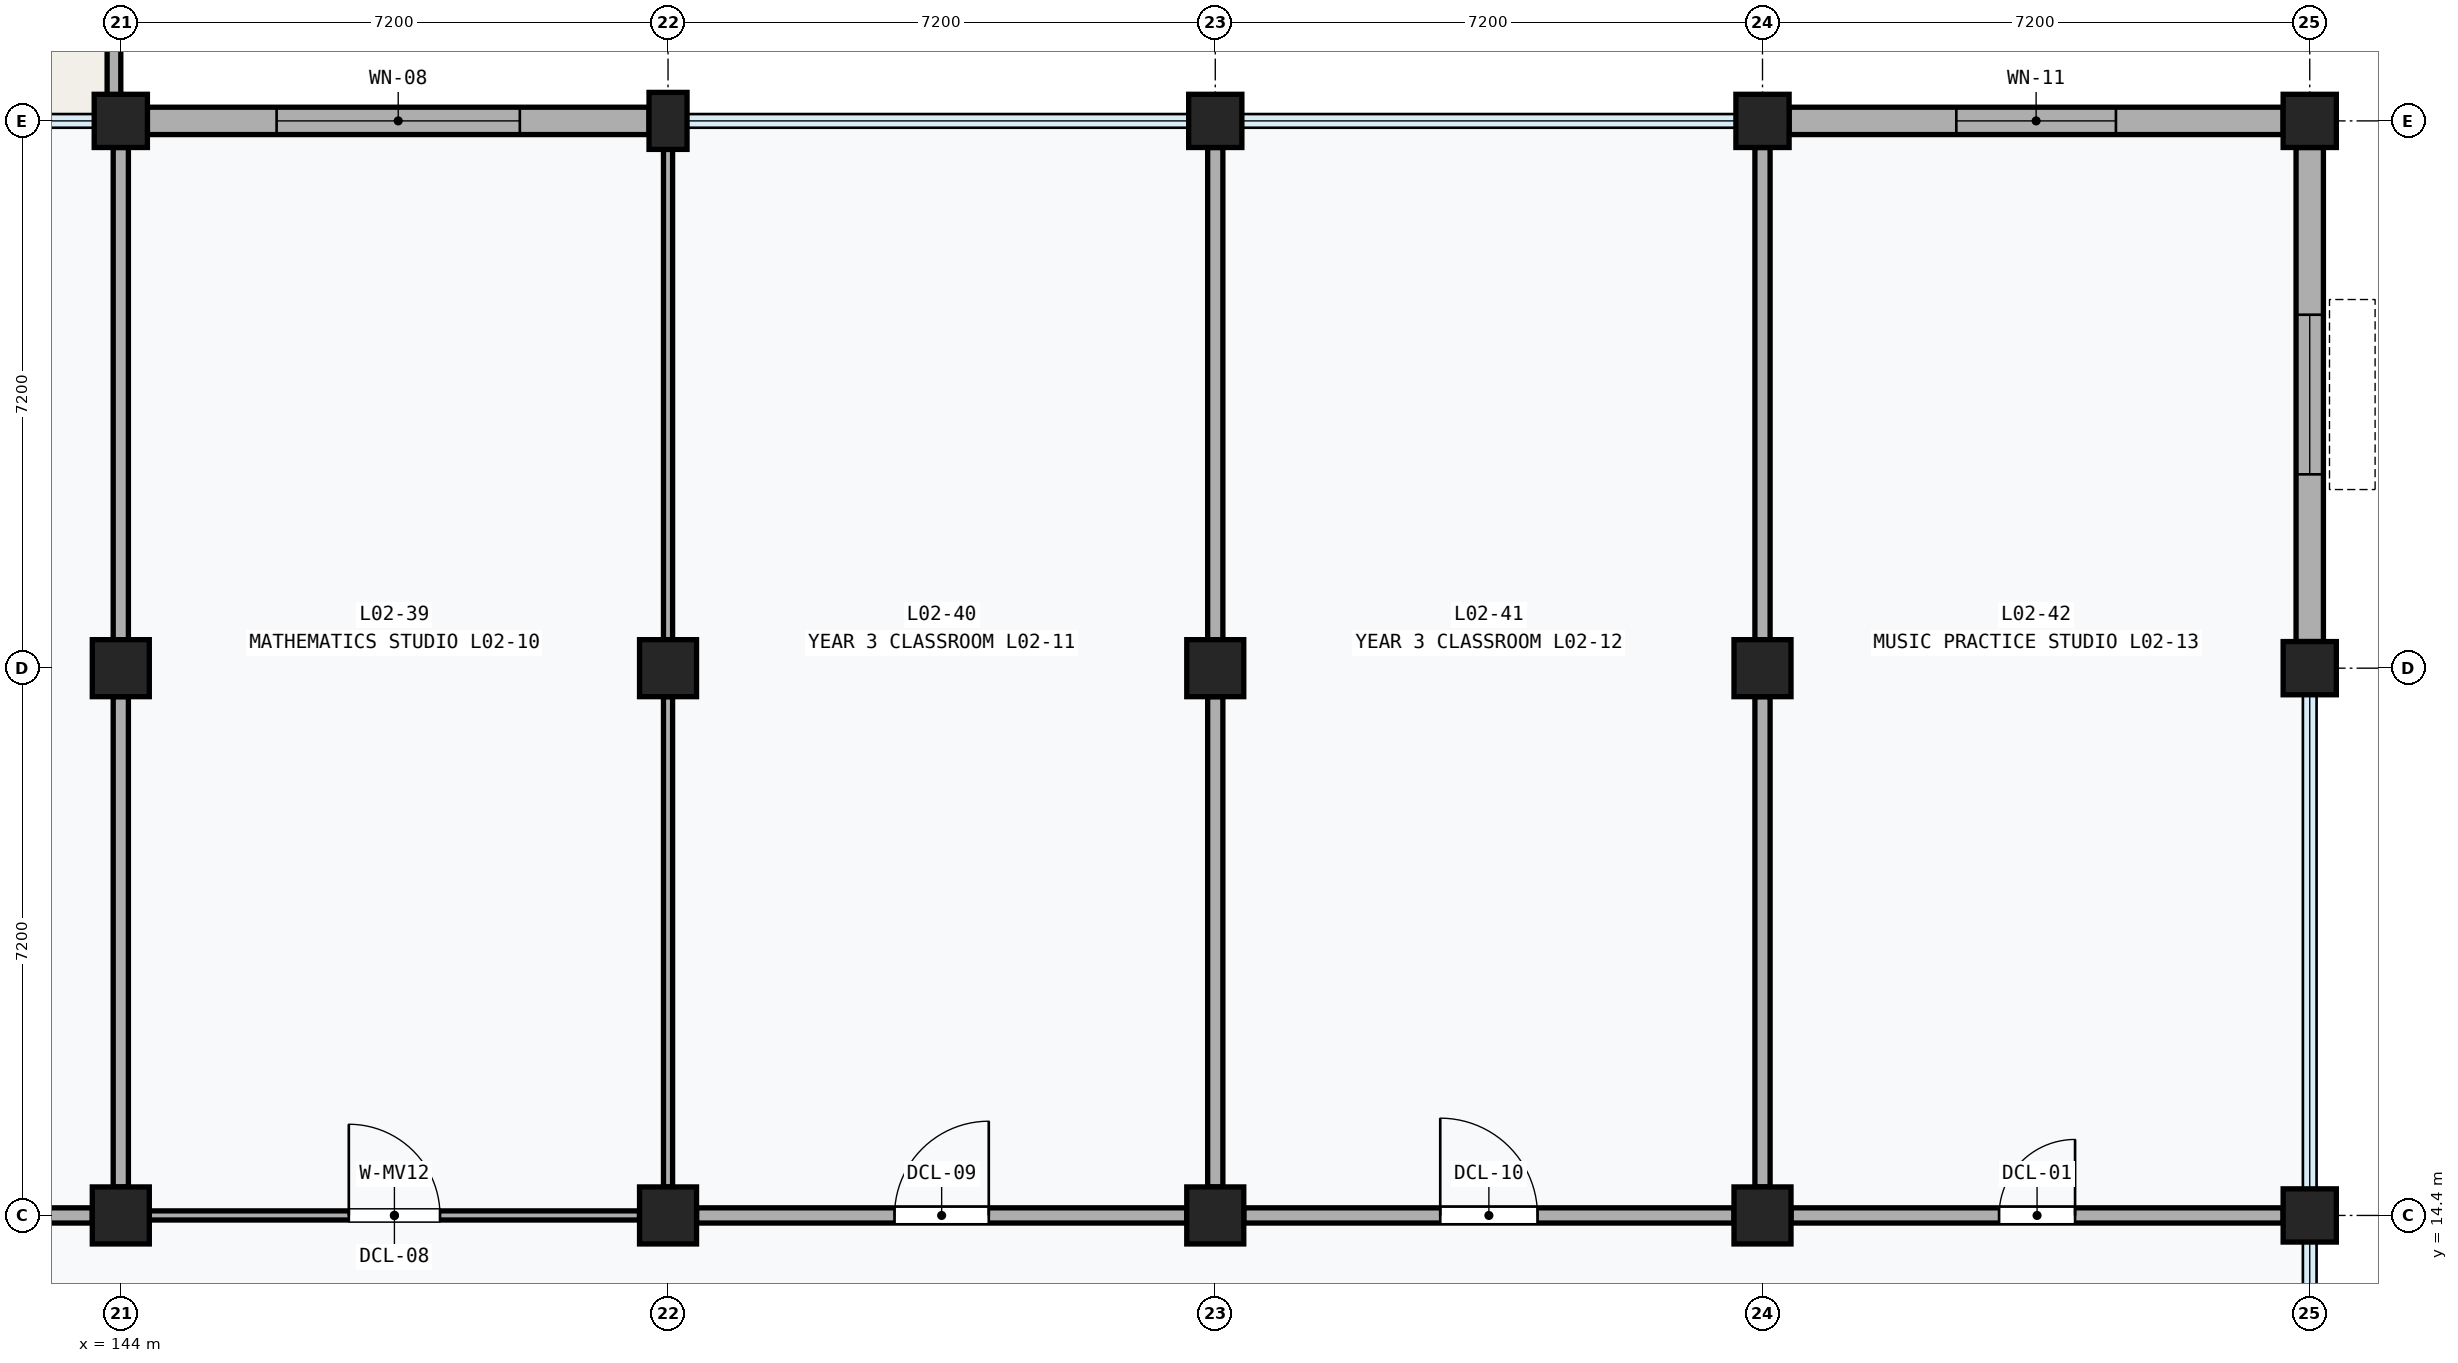
"""IFC4 building model, lengths in metres.
Left out: names, types, materials, properties, quantities, classifications, styles, units other than length and angle.
Written with IfcOpenShell. Run it as: python <this file> out.ifc"""

import sys

from ifc_helpers import new_model, si_unit, direction, frame, frame_2d, origin, origin_2d, place, context, subcontext, project, spatial, rectangle, extrude, element, fill, save


model = new_model("IFC4")
c1 = context("Model", 3, precision=1e-05, world=origin(), true_north=direction((0.0, 1.0)))
c2 = subcontext(c1, "Body", "Model", "MODEL_VIEW")
j1 = project(units=[si_unit("LENGTHUNIT", "METRE"), si_unit("PLANEANGLEUNIT", "RADIAN")], contexts=[c1])
p1 = place(None, origin())
s1 = spatial("IfcSite", under=j1, at=p1, CompositionType="ELEMENT")
p2 = place(p1, origin())
s2 = spatial("IfcBuilding", under=s1, at=p2, CompositionType="ELEMENT")
p3 = place(p2, frame((0.0, 0.0, 9.6)))
s3 = spatial("IfcBuildingStorey", under=s2, at=p3, CompositionType="ELEMENT", Elevation=9.6)
for number, where, z_axis, x_axis in (
    (1, (144.0, 14.4, 0.0), (0.0, 0.0, 1.0), (1.0, 0.0, 0.0)),
    (2, (144.0, 21.6, 0.0), (0.0, 0.0, 1.0), (1.0, 0.0, 0.0)),
):
    element("IfcColumn", number, at=place(p3, frame(where, z_axis=z_axis, x_axis=x_axis)), inside=s3, PredefinedType="COLUMN", context=c2, shape_type="SweptSolid", body=[
        extrude(rectangle(XDim=0.75, YDim=0.75, at=origin_2d()), origin(), (0.0, 0.0, 1.0), 4.8),
    ])
p4 = place(p3, frame((144.0, 28.8, 0.0), z_axis=(0.0, 0.0, 1.0), x_axis=(1.0, 0.0, 0.0)))
e3 = element("IfcColumn", 3, at=p4, inside=s3, PredefinedType="COLUMN", context=c2, shape_type="SweptSolid", body=[
    extrude(rectangle(XDim=0.7, YDim=0.7, at=origin_2d()), origin(), (0.0, 0.0, 1.0), 4.8),
])
for number, where, z_axis, x_axis in (
    (4, (151.2, 14.4, 0.0), (0.0, 0.0, 1.0), (1.0, 0.0, 0.0)),
    (5, (151.2, 21.6, 0.0), (0.0, 0.0, 1.0), (1.0, 0.0, 0.0)),
):
    element("IfcColumn", number, at=place(p3, frame(where, z_axis=z_axis, x_axis=x_axis)), inside=s3, PredefinedType="COLUMN", context=c2, shape_type="SweptSolid", body=[
        extrude(rectangle(XDim=0.75, YDim=0.75, at=origin_2d()), origin(), (0.0, 0.0, 1.0), 4.8),
    ])
p5 = place(p3, frame((151.2, 28.8, 0.0), z_axis=(0.0, 0.0, 1.0), x_axis=(1.0, 0.0, 0.0)))
e6 = element("IfcColumn", 6, at=p5, inside=s3, PredefinedType="PILASTER", context=c2, shape_type="SweptSolid", body=[
    extrude(rectangle(XDim=0.5, YDim=0.75, at=origin_2d()), origin(), (0.0, 0.0, 1.0), 4.8),
])
for number, where, z_axis, x_axis in (
    (7, (158.4, 14.4, 0.0), (0.0, 0.0, 1.0), (1.0, 0.0, 0.0)),
    (8, (158.4, 21.6, 0.0), (0.0, 0.0, 1.0), (1.0, 0.0, 0.0)),
):
    element("IfcColumn", number, at=place(p3, frame(where, z_axis=z_axis, x_axis=x_axis)), inside=s3, PredefinedType="COLUMN", context=c2, shape_type="SweptSolid", body=[
        extrude(rectangle(XDim=0.75, YDim=0.75, at=origin_2d()), origin(), (0.0, 0.0, 1.0), 4.8),
    ])
p6 = place(p3, frame((158.4, 28.8, 0.0), z_axis=(0.0, 0.0, 1.0), x_axis=(1.0, 0.0, 0.0)))
e9 = element("IfcColumn", 9, at=p6, inside=s3, PredefinedType="COLUMN", context=c2, shape_type="SweptSolid", body=[
    extrude(rectangle(XDim=0.7, YDim=0.7, at=origin_2d()), origin(), (0.0, 0.0, 1.0), 4.8),
])
for number, where, z_axis, x_axis in (
    (10, (165.6, 14.4, 0.0), (0.0, 0.0, 1.0), (1.0, 0.0, 0.0)),
    (11, (165.6, 21.6, 0.0), (0.0, 0.0, 1.0), (1.0, 0.0, 0.0)),
):
    element("IfcColumn", number, at=place(p3, frame(where, z_axis=z_axis, x_axis=x_axis)), inside=s3, PredefinedType="COLUMN", context=c2, shape_type="SweptSolid", body=[
        extrude(rectangle(XDim=0.75, YDim=0.75, at=origin_2d()), origin(), (0.0, 0.0, 1.0), 4.8),
    ])
for number, where, z_axis, x_axis in (
    (12, (165.6, 28.8, 0.0), (0.0, 0.0, 1.0), (1.0, 0.0, 0.0)),
    (13, (172.8, 14.4, 0.0), (0.0, 0.0, 1.0), (1.0, 0.0, 0.0)),
    (14, (172.8, 21.6, 0.0), (0.0, 0.0, 1.0), (1.0, 0.0, 0.0)),
    (15, (172.8, 28.8, 0.0), (0.0, 0.0, 1.0), (1.0, 0.0, 0.0)),
):
    element("IfcColumn", number, at=place(p3, frame(where, z_axis=z_axis, x_axis=x_axis)), inside=s3, PredefinedType="COLUMN", context=c2, shape_type="SweptSolid", body=[
        extrude(rectangle(XDim=0.7, YDim=0.7, at=origin_2d()), origin(), (0.0, 0.0, 1.0), 4.8),
    ])
p7 = place(p3, frame((144.35, 28.8, 0.0), z_axis=(0.0, 0.0, 1.0), x_axis=(1.0, 0.0, 0.0)))
e16 = element("IfcWall", 16, at=p7, inside=s3, PredefinedType="SOLIDWALL", context=c2, shape_type="SweptSolid", body=[
    extrude(rectangle(XDim=6.6, YDim=0.36, at=frame_2d((3.3, 0.0))), origin(), (0.0, 0.0, 1.0), 3.88),
])
p8 = place(p7, frame((1.7, 0.0, 0.9)))
e17 = element("IfcOpeningElement", 17, at=p8, cuts=e16, PredefinedType="OPENING", context=c2, shape_type="SweptSolid", body=[
    extrude(rectangle(XDim=3.2, YDim=1.8, at=frame_2d((1.6, 0.9))), frame((0.0, 0.192, 0.0), z_axis=(0.0, -1.0, 0.0), x_axis=(1.0, 0.0, 0.0)), (0.0, 0.0, 1.0), 0.384),
])
p9 = place(p3, frame((165.95, 28.8, 0.0), z_axis=(0.0, 0.0, 1.0), x_axis=(1.0, 0.0, 0.0)))
e18 = element("IfcWall", 18, at=p9, inside=s3, PredefinedType="SOLIDWALL", context=c2, shape_type="SweptSolid", body=[
    extrude(rectangle(XDim=6.5, YDim=0.36, at=frame_2d((3.25, 0.0))), origin(), (0.0, 0.0, 1.0), 3.88),
])
p10 = place(p9, frame((2.2, 0.0, 0.85)))
e19 = element("IfcOpeningElement", 19, at=p10, cuts=e18, PredefinedType="OPENING", context=c2, shape_type="SweptSolid", body=[
    extrude(rectangle(XDim=2.1, YDim=2.0, at=frame_2d((1.05, 1.0))), frame((0.0, 0.192, 0.0), z_axis=(0.0, -1.0, 0.0), x_axis=(1.0, 0.0, 0.0)), (0.0, 0.0, 1.0), 0.384),
])
p11 = place(p3, frame((172.8, 21.95, 0.0), z_axis=(0.0, 0.0, 1.0), x_axis=(0.0, 1.0, 0.0)))
e20 = element("IfcWall", 20, at=p11, inside=s3, PredefinedType="SOLIDWALL", context=c2, shape_type="SweptSolid", body=[
    extrude(rectangle(XDim=6.5, YDim=0.36, at=frame_2d((3.25, 0.0))), origin(), (0.0, 0.0, 1.0), 3.88),
])
p12 = place(p11, frame((2.2, 0.0, 0.85)))
e21 = element("IfcOpeningElement", 21, at=p12, cuts=e20, PredefinedType="OPENING", context=c2, shape_type="SweptSolid", body=[
    extrude(rectangle(XDim=2.1, YDim=2.0, at=frame_2d((1.05, 1.0))), frame((0.0, 0.192, 0.0), z_axis=(0.0, -1.0, 0.0), x_axis=(1.0, 0.0, 0.0)), (0.0, 0.0, 1.0), 0.384),
])
p13 = place(p3, frame((143.91, 28.89, 0.0), z_axis=(0.0, 0.0, 1.0), x_axis=(0.0, 1.0, 0.0)))
e22 = element("IfcWall", 22, at=p13, inside=s3, PredefinedType="PARAPET", context=c2, shape_type="SweptSolid", body=[
    extrude(rectangle(XDim=7.02, YDim=0.18, at=frame_2d((3.51, 0.0))), origin(), (0.0, 0.0, 1.0), 0.95),
])
p14 = place(p3, frame((137.175, 14.4, 0.0), z_axis=(0.0, 0.0, 1.0), x_axis=(1.0, 0.0, 0.0)))
e23 = element("IfcWall", 23, at=p14, inside=s3, PredefinedType="PARTITIONING", context=c2, shape_type="SweptSolid", body=[
    extrude(rectangle(XDim=6.45, YDim=0.2, at=frame_2d((3.225, 0.0))), origin(), (0.0, 0.0, 1.0), 3.74),
])
p15 = place(p14, frame((2.645, 0.0, 0.0)))
e24 = element("IfcOpeningElement", 24, at=p15, cuts=e23, PredefinedType="OPENING", context=c2, shape_type="SweptSolid", body=[
    extrude(rectangle(XDim=1.16, YDim=2.22, at=frame_2d((0.58, 1.11))), frame((0.0, 0.112, 0.0), z_axis=(0.0, -1.0, 0.0), x_axis=(1.0, 0.0, 0.0)), (0.0, 0.0, 1.0), 0.224),
])
p16 = place(p3, frame((144.0, 14.775, 0.0), z_axis=(0.0, 0.0, 1.0), x_axis=(0.0, 1.0, 0.0)))
e25 = element("IfcWall", 25, at=p16, inside=s3, PredefinedType="PARTITIONING", context=c2, shape_type="SweptSolid", body=[
    extrude(rectangle(XDim=6.45, YDim=0.2, at=frame_2d((3.225, 0.0))), origin(), (0.0, 0.0, 1.0), 3.74),
])
p17 = place(p3, frame((144.0, 21.975, 0.0), z_axis=(0.0, 0.0, 1.0), x_axis=(0.0, 1.0, 0.0)))
e26 = element("IfcWall", 26, at=p17, inside=s3, PredefinedType="PARTITIONING", context=c2, shape_type="SweptSolid", body=[
    extrude(rectangle(XDim=6.475, YDim=0.2, at=frame_2d((3.237, 0.0))), origin(), (0.0, 0.0, 1.0), 3.74),
])
p18 = place(p3, frame((144.375, 14.4, 0.0), z_axis=(0.0, 0.0, 1.0), x_axis=(1.0, 0.0, 0.0)))
e27 = element("IfcWall", 27, at=p18, inside=s3, PredefinedType="MOVABLE", context=c2, shape_type="SweptSolid", body=[
    extrude(rectangle(XDim=6.45, YDim=0.12, at=frame_2d((3.225, 0.0))), origin(), (0.0, 0.0, 1.0), 3.74),
])
p19 = place(p18, frame((2.625, 0.0, 0.0)))
e28 = element("IfcOpeningElement", 28, at=p19, cuts=e27, PredefinedType="OPENING", context=c2, shape_type="SweptSolid", body=[
    extrude(rectangle(XDim=1.2, YDim=2.24, at=frame_2d((0.6, 1.12))), frame((0.0, 0.072, 0.0), z_axis=(0.0, -1.0, 0.0), x_axis=(1.0, 0.0, 0.0)), (0.0, 0.0, 1.0), 0.144),
])
p20 = place(p3, frame((151.2, 14.775, 0.0), z_axis=(0.0, 0.0, 1.0), x_axis=(0.0, 1.0, 0.0)))
e29 = element("IfcWall", 29, at=p20, inside=s3, PredefinedType="MOVABLE", context=c2, shape_type="SweptSolid", body=[
    extrude(rectangle(XDim=6.45, YDim=0.12, at=frame_2d((3.225, 0.0))), origin(), (0.0, 0.0, 1.0), 3.74),
])
p21 = place(p3, frame((151.2, 21.975, 0.0), z_axis=(0.0, 0.0, 1.0), x_axis=(0.0, 1.0, 0.0)))
e30 = element("IfcWall", 30, at=p21, inside=s3, PredefinedType="MOVABLE", context=c2, shape_type="SweptSolid", body=[
    extrude(rectangle(XDim=6.45, YDim=0.12, at=frame_2d((3.225, 0.0))), origin(), (0.0, 0.0, 1.0), 3.74),
])
p22 = place(p3, frame((151.575, 14.4, 0.0), z_axis=(0.0, 0.0, 1.0), x_axis=(1.0, 0.0, 0.0)))
e31 = element("IfcWall", 31, at=p22, inside=s3, PredefinedType="PARTITIONING", context=c2, shape_type="SweptSolid", body=[
    extrude(rectangle(XDim=6.45, YDim=0.2, at=frame_2d((3.225, 0.0))), origin(), (0.0, 0.0, 1.0), 3.74),
])
p23 = place(p22, frame((2.605, 0.0, 0.0)))
e32 = element("IfcOpeningElement", 32, at=p23, cuts=e31, PredefinedType="OPENING", context=c2, shape_type="SweptSolid", body=[
    extrude(rectangle(XDim=1.24, YDim=2.26, at=frame_2d((0.62, 1.13))), frame((0.0, 0.112, 0.0), z_axis=(0.0, -1.0, 0.0), x_axis=(1.0, 0.0, 0.0)), (0.0, 0.0, 1.0), 0.224),
])
p24 = place(p3, frame((158.4, 14.775, 0.0), z_axis=(0.0, 0.0, 1.0), x_axis=(0.0, 1.0, 0.0)))
e33 = element("IfcWall", 33, at=p24, inside=s3, PredefinedType="PARTITIONING", context=c2, shape_type="SweptSolid", body=[
    extrude(rectangle(XDim=6.45, YDim=0.2, at=frame_2d((3.225, 0.0))), origin(), (0.0, 0.0, 1.0), 3.74),
])
p25 = place(p3, frame((158.4, 21.975, 0.0), z_axis=(0.0, 0.0, 1.0), x_axis=(0.0, 1.0, 0.0)))
e34 = element("IfcWall", 34, at=p25, inside=s3, PredefinedType="PARTITIONING", context=c2, shape_type="SweptSolid", body=[
    extrude(rectangle(XDim=6.475, YDim=0.2, at=frame_2d((3.237, 0.0))), origin(), (0.0, 0.0, 1.0), 3.74),
])
p26 = place(p3, frame((158.775, 14.4, 0.0), z_axis=(0.0, 0.0, 1.0), x_axis=(1.0, 0.0, 0.0)))
e35 = element("IfcWall", 35, at=p26, inside=s3, PredefinedType="PARTITIONING", context=c2, shape_type="SweptSolid", body=[
    extrude(rectangle(XDim=6.45, YDim=0.2, at=frame_2d((3.225, 0.0))), origin(), (0.0, 0.0, 1.0), 3.81),
])
p27 = place(p26, frame((2.585, 0.0, 0.0)))
e36 = element("IfcOpeningElement", 36, at=p27, cuts=e35, PredefinedType="OPENING", context=c2, shape_type="SweptSolid", body=[
    extrude(rectangle(XDim=1.28, YDim=2.28, at=frame_2d((0.64, 1.14))), frame((0.0, 0.112, 0.0), z_axis=(0.0, -1.0, 0.0), x_axis=(1.0, 0.0, 0.0)), (0.0, 0.0, 1.0), 0.224),
])
p28 = place(p3, frame((165.6, 14.775, 0.0), z_axis=(0.0, 0.0, 1.0), x_axis=(0.0, 1.0, 0.0)))
e37 = element("IfcWall", 37, at=p28, inside=s3, PredefinedType="PARTITIONING", context=c2, shape_type="SweptSolid", body=[
    extrude(rectangle(XDim=6.45, YDim=0.2, at=frame_2d((3.225, 0.0))), origin(), (0.0, 0.0, 1.0), 3.74),
])
p29 = place(p3, frame((165.6, 21.975, 0.0), z_axis=(0.0, 0.0, 1.0), x_axis=(0.0, 1.0, 0.0)))
e38 = element("IfcWall", 38, at=p29, inside=s3, PredefinedType="PARTITIONING", context=c2, shape_type="SweptSolid", body=[
    extrude(rectangle(XDim=6.475, YDim=0.2, at=frame_2d((3.237, 0.0))), origin(), (0.0, 0.0, 1.0), 3.74),
])
p30 = place(p3, frame((165.975, 14.4, 0.0), z_axis=(0.0, 0.0, 1.0), x_axis=(1.0, 0.0, 0.0)))
e39 = element("IfcWall", 39, at=p30, inside=s3, PredefinedType="PARTITIONING", context=c2, shape_type="SweptSolid", body=[
    extrude(rectangle(XDim=6.475, YDim=0.2, at=frame_2d((3.237, 0.0))), origin(), (0.0, 0.0, 1.0), 3.74),
])
p31 = place(p30, frame((2.738, 0.0, 0.0)))
e40 = element("IfcOpeningElement", 40, at=p31, cuts=e39, PredefinedType="OPENING", context=c2, shape_type="SweptSolid", body=[
    extrude(rectangle(XDim=1.0, YDim=2.1, at=frame_2d((0.5, 1.05))), frame((0.0, 0.112, 0.0), z_axis=(0.0, -1.0, 0.0), x_axis=(1.0, 0.0, 0.0)), (0.0, 0.0, 1.0), 0.224),
])
p32 = place(p8, origin())
e41 = element("IfcWindow", 41, at=p32, inside=s3, PartitioningType="SINGLE_PANEL", PredefinedType="WINDOW", context=c2, shape_type="SweptSolid", body=[
    extrude(rectangle(XDim=3.2, YDim=1.8, at=frame_2d((1.6, 0.9))), frame((0.0, 0.03, 0.0), z_axis=(0.0, -1.0, 0.0), x_axis=(1.0, 0.0, 0.0)), (0.0, 0.0, 1.0), 0.06),
])
fill(e17, e41)
p33 = place(p10, origin())
e42 = element("IfcWindow", 42, at=p33, inside=s3, PartitioningType="SINGLE_PANEL", PredefinedType="WINDOW", context=c2, shape_type="SweptSolid", body=[
    extrude(rectangle(XDim=2.1, YDim=2.0, at=frame_2d((1.05, 1.0))), frame((0.0, 0.03, 0.0), z_axis=(0.0, -1.0, 0.0), x_axis=(1.0, 0.0, 0.0)), (0.0, 0.0, 1.0), 0.06),
])
fill(e19, e42)
p34 = place(p12, origin())
e43 = element("IfcWindow", 43, at=p34, inside=s3, PartitioningType="SINGLE_PANEL", PredefinedType="WINDOW", context=c2, shape_type="SweptSolid", body=[
    extrude(rectangle(XDim=2.1, YDim=2.0, at=frame_2d((1.05, 1.0))), frame((0.0, 0.03, 0.0), z_axis=(0.0, -1.0, 0.0), x_axis=(1.0, 0.0, 0.0)), (0.0, 0.0, 1.0), 0.06),
])
fill(e21, e43)
p35 = place(p19, origin())
e44 = element("IfcDoor", 44, at=p35, inside=s3, OperationType="SINGLE_SWING_LEFT", PredefinedType="DOOR", context=c2, shape_type="SweptSolid", body=[
    extrude(rectangle(XDim=1.2, YDim=2.24, at=frame_2d((0.6, 1.12))), frame((0.0, 0.025, 0.0), z_axis=(0.0, -1.0, 0.0), x_axis=(1.0, 0.0, 0.0)), (0.0, 0.0, 1.0), 0.05),
])
fill(e28, e44)
p36 = place(p23, origin())
e45 = element("IfcDoor", 45, at=p36, inside=s3, OperationType="SINGLE_SWING_RIGHT", PredefinedType="DOOR", context=c2, shape_type="SweptSolid", body=[
    extrude(rectangle(XDim=1.24, YDim=2.26, at=frame_2d((0.62, 1.13))), frame((0.0, 0.025, 0.0), z_axis=(0.0, -1.0, 0.0), x_axis=(1.0, 0.0, 0.0)), (0.0, 0.0, 1.0), 0.05),
])
fill(e32, e45)
p37 = place(p27, origin())
e46 = element("IfcDoor", 46, at=p37, inside=s3, OperationType="SINGLE_SWING_LEFT", PredefinedType="DOOR", context=c2, shape_type="SweptSolid", body=[
    extrude(rectangle(XDim=1.28, YDim=2.28, at=frame_2d((0.64, 1.14))), frame((0.0, 0.025, 0.0), z_axis=(0.0, -1.0, 0.0), x_axis=(1.0, 0.0, 0.0)), (0.0, 0.0, 1.0), 0.05),
])
fill(e36, e46)
p38 = place(p31, origin())
e47 = element("IfcDoor", 47, at=p38, inside=s3, OperationType="SINGLE_SWING_RIGHT", PredefinedType="DOOR", context=c2, shape_type="SweptSolid", body=[
    extrude(rectangle(XDim=1.0, YDim=2.1, at=frame_2d((0.5, 1.05))), frame((0.0, 0.025, 0.0), z_axis=(0.0, -1.0, 0.0), x_axis=(1.0, 0.0, 0.0)), (0.0, 0.0, 1.0), 0.05),
])
fill(e40, e47)
save(model, sys.argv[1])
